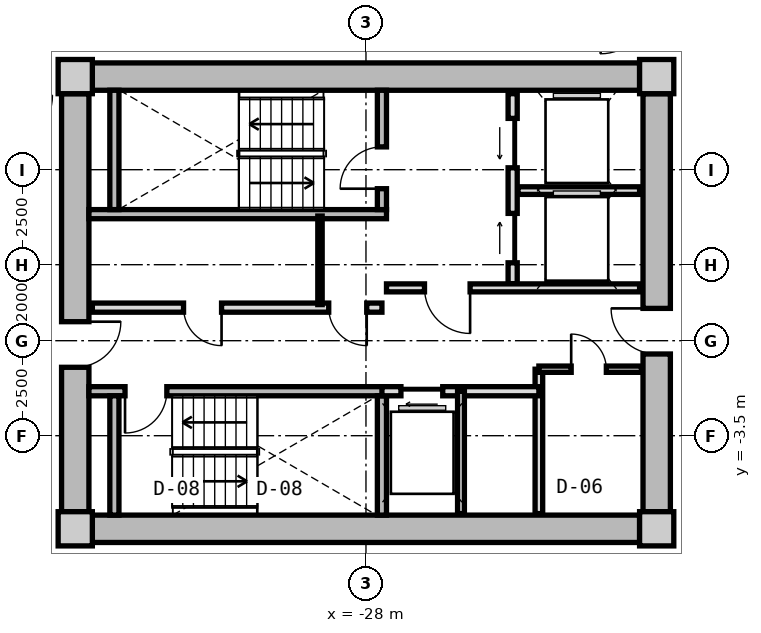
"""IFC4 building model, lengths in metres.
Left out: names, types, materials, properties, quantities, classifications, styles, units other than length and angle.
Written with IfcOpenShell. Run it as: python <this file> out.ifc"""

import sys

from ifc_helpers import new_model, si_unit, direction, frame, frame_2d, origin, origin_2d, place, context, subcontext, project, spatial, rectangle, extrude, source, transform, mapped, element, fill, save


model = new_model("IFC4")
c1 = context("Model", 3, precision=1e-05, world=origin(), true_north=direction((0.0, 1.0)))
c2 = subcontext(c1, "Body", "Model", "MODEL_VIEW")
j1 = project(units=[si_unit("LENGTHUNIT", "METRE"), si_unit("PLANEANGLEUNIT", "RADIAN")], contexts=[c1])
p1 = place(None, origin())
s1 = spatial("IfcSite", under=j1, at=p1, CompositionType="ELEMENT")
p2 = place(p1, origin())
s2 = spatial("IfcBuilding", under=s1, at=p2, CompositionType="ELEMENT")
p3 = place(p2, frame((0.0, 0.0, 120.65)))
s3 = spatial("IfcBuildingStorey", under=s2, at=p3, CompositionType="ELEMENT", Elevation=120.65)
m1 = source(origin(), c2, "Body", "SweptSolid", [
    extrude(rectangle(XDim=0.9, YDim=0.9, at=origin_2d()), origin(), (0.0, 0.0, 1.0), 3.05),
])
for number, where, z_axis, x_axis in (
    (1, (-35.65, -5.95, 0.0), (0.0, 0.0, 1.0), (1.0, 0.0, 0.0)),
    (2, (-20.35, -5.95, 0.0), (0.0, 0.0, 1.0), (1.0, 0.0, 0.0)),
    (3, (-20.35, 5.95, 0.0), (0.0, 0.0, 1.0), (1.0, 0.0, 0.0)),
    (4, (-35.65, 5.95, 0.0), (0.0, 0.0, 1.0), (1.0, 0.0, 0.0)),
):
    element("IfcColumn", number, at=place(p3, frame(where, z_axis=z_axis, x_axis=x_axis)), inside=s3, PredefinedType="COLUMN", context=c2, shape_type="MappedRepresentation", body=[
        mapped(m1, transform((0.0, 0.0, 0.0), x_axis=(1.0, 0.0, 0.0), y_axis=(0.0, 1.0, 0.0), z_axis=(0.0, 0.0, 1.0), scale=1.0)),
    ])
m2 = source(origin(), c2, "Body", "SweptSolid", [
    extrude(rectangle(XDim=14.4, YDim=0.72, at=frame_2d((7.2, 0.0))), origin(), (0.0, 0.0, 1.0), 2.79),
])
for number, where, z_axis, x_axis in (
    (5, (-35.2, 5.95, 0.0), (0.0, 0.0, 1.0), (1.0, 0.0, 0.0)),
    (6, (-20.8, -5.95, 0.0), (0.0, 0.0, 1.0), (-1.0, 0.0, 0.0)),
):
    element("IfcWall", number, at=place(p3, frame(where, z_axis=z_axis, x_axis=x_axis)), inside=s3, PredefinedType="SHEAR", context=c2, shape_type="MappedRepresentation", body=[
        mapped(m2, transform((0.0, 0.0, 0.0), x_axis=(1.0, 0.0, 0.0), y_axis=(0.0, 1.0, 0.0), z_axis=(0.0, 0.0, 1.0), scale=1.0)),
    ])
m3 = source(origin(), c2, "Body", "SweptSolid", [
    extrude(rectangle(XDim=11.0, YDim=0.72, at=frame_2d((5.5, 0.0))), origin(), (0.0, 0.0, 1.0), 2.79),
])
p4 = place(p3, frame((-35.65, -5.5, 0.0), z_axis=(0.0, 0.0, 1.0), x_axis=(0.0, 1.0, 0.0)))
e7 = element("IfcWall", 7, at=p4, inside=s3, PredefinedType="SHEAR", context=c2, shape_type="MappedRepresentation", body=[
    mapped(m3, transform((0.0, 0.0, 0.0), x_axis=(1.0, 0.0, 0.0), y_axis=(0.0, 1.0, 0.0), z_axis=(0.0, 0.0, 1.0), scale=1.0)),
])
p5 = place(p4, frame((3.8, 0.0, 0.0)))
e8 = element("IfcOpeningElement", 8, at=p5, cuts=e7, PredefinedType="OPENING", context=c2, shape_type="SweptSolid", body=[
    extrude(rectangle(XDim=1.2, YDim=2.15, at=frame_2d((0.6, 1.075))), frame((0.0, 0.37, 0.0), z_axis=(0.0, -1.0, 0.0), x_axis=(1.0, 0.0, 0.0)), (0.0, 0.0, 1.0), 0.74),
])
p6 = place(p3, frame((-20.35, 5.5, 0.0), z_axis=(0.0, 0.0, 1.0), x_axis=(0.0, -1.0, 0.0)))
e9 = element("IfcWall", 9, at=p6, inside=s3, PredefinedType="SHEAR", context=c2, shape_type="MappedRepresentation", body=[
    mapped(m3, transform((0.0, 0.0, 0.0), x_axis=(1.0, 0.0, 0.0), y_axis=(0.0, 1.0, 0.0), z_axis=(0.0, 0.0, 1.0), scale=1.0)),
])
p7 = place(p6, frame((5.65, 0.0, 0.0)))
e10 = element("IfcOpeningElement", 10, at=p7, cuts=e9, PredefinedType="OPENING", context=c2, shape_type="SweptSolid", body=[
    extrude(rectangle(XDim=1.2, YDim=2.15, at=frame_2d((0.6, 1.075))), frame((0.0, 0.37, 0.0), z_axis=(0.0, -1.0, 0.0), x_axis=(1.0, 0.0, 0.0)), (0.0, 0.0, 1.0), 0.74),
])
m4 = source(origin(), c2, "Body", "SweptSolid", [
    extrude(rectangle(XDim=7.83, YDim=0.24, at=frame_2d((3.915, 0.0))), origin(), (0.0, 0.0, 1.0), 2.79),
])
p8 = place(p3, frame((-35.29, 2.33, 0.0), z_axis=(0.0, 0.0, 1.0), x_axis=(1.0, 0.0, 0.0)))
e11 = element("IfcWall", 11, at=p8, inside=s3, PredefinedType="PARTITIONING", context=c2, shape_type="MappedRepresentation", body=[
    mapped(m4, transform((0.0, 0.0, 0.0), x_axis=(1.0, 0.0, 0.0), y_axis=(0.0, 1.0, 0.0), z_axis=(0.0, 0.0, 1.0), scale=1.0)),
])
m5 = source(origin(), c2, "Body", "SweptSolid", [
    extrude(rectangle(XDim=3.14, YDim=0.24, at=frame_2d((1.57, 0.0))), origin(), (0.0, 0.0, 1.0), 2.79),
])
p9 = place(p3, frame((-34.62, 2.45, 0.0), z_axis=(0.0, 0.0, 1.0), x_axis=(0.0, 1.0, 0.0)))
e12 = element("IfcWall", 12, at=p9, inside=s3, PredefinedType="PARTITIONING", context=c2, shape_type="MappedRepresentation", body=[
    mapped(m5, transform((0.0, 0.0, 0.0), x_axis=(1.0, 0.0, 0.0), y_axis=(0.0, 1.0, 0.0), z_axis=(0.0, 0.0, 1.0), scale=1.0)),
])
p10 = place(p3, frame((-27.58, 2.45, 0.0), z_axis=(0.0, 0.0, 1.0), x_axis=(0.0, 1.0, 0.0)))
e13 = element("IfcWall", 13, at=p10, inside=s3, PredefinedType="PARTITIONING", context=c2, shape_type="MappedRepresentation", body=[
    mapped(m5, transform((0.0, 0.0, 0.0), x_axis=(1.0, 0.0, 0.0), y_axis=(0.0, 1.0, 0.0), z_axis=(0.0, 0.0, 1.0), scale=1.0)),
])
p11 = place(p10, frame((0.55, 0.0, 0.0)))
e14 = element("IfcOpeningElement", 14, at=p11, cuts=e13, PredefinedType="OPENING", context=c2, shape_type="SweptSolid", body=[
    extrude(rectangle(XDim=1.1, YDim=2.15, at=frame_2d((0.55, 1.075))), frame((0.0, 0.13, 0.0), z_axis=(0.0, -1.0, 0.0), x_axis=(1.0, 0.0, 0.0)), (0.0, 0.0, 1.0), 0.26),
])
p12 = place(p3, frame((-35.29, -2.33, 0.0), z_axis=(0.0, 0.0, 1.0), x_axis=(1.0, 0.0, 0.0)))
e15 = element("IfcWall", 15, at=p12, inside=s3, PredefinedType="PARTITIONING", context=c2, shape_type="MappedRepresentation", body=[
    mapped(m4, transform((0.0, 0.0, 0.0), x_axis=(1.0, 0.0, 0.0), y_axis=(0.0, 1.0, 0.0), z_axis=(0.0, 0.0, 1.0), scale=1.0)),
])
p13 = place(p12, frame((0.95, 0.0, 0.0)))
e16 = element("IfcOpeningElement", 16, at=p13, cuts=e15, PredefinedType="OPENING", context=c2, shape_type="SweptSolid", body=[
    extrude(rectangle(XDim=1.1, YDim=2.15, at=frame_2d((0.55, 1.075))), frame((0.0, 0.13, 0.0), z_axis=(0.0, -1.0, 0.0), x_axis=(1.0, 0.0, 0.0)), (0.0, 0.0, 1.0), 0.26),
])
for number, where, z_axis, x_axis in (
    (17, (-34.62, -5.59, 0.0), (0.0, 0.0, 1.0), (0.0, 1.0, 0.0)),
    (18, (-27.58, -5.59, 0.0), (0.0, 0.0, 1.0), (0.0, 1.0, 0.0)),
):
    element("IfcWall", number, at=place(p3, frame(where, z_axis=z_axis, x_axis=x_axis)), inside=s3, PredefinedType="PARTITIONING", context=c2, shape_type="MappedRepresentation", body=[
        mapped(m5, transform((0.0, 0.0, 0.0), x_axis=(1.0, 0.0, 0.0), y_axis=(0.0, 1.0, 0.0), z_axis=(0.0, 0.0, 1.0), scale=1.0)),
    ])
m6 = source(origin(), c2, "Body", "SweptSolid", [
    extrude(rectangle(XDim=5.0, YDim=0.24, at=frame_2d((2.5, 0.0))), origin(), (0.0, 0.0, 1.0), 2.775),
])
p14 = place(p3, frame((-24.14, 0.5, 0.0), z_axis=(0.0, 0.0, 1.0), x_axis=(0.0, 1.0, 0.0)))
e19 = element("IfcWall", 19, at=p14, inside=s3, PredefinedType="PARTITIONING", context=c2, shape_type="MappedRepresentation", body=[
    mapped(m6, transform((0.0, 0.0, 0.0), x_axis=(1.0, 0.0, 0.0), y_axis=(0.0, 1.0, 0.0), z_axis=(0.0, 0.0, 1.0), scale=1.0)),
])
p15 = place(p14, frame((3.05, 0.0, 0.0)))
e20 = element("IfcOpeningElement", 20, at=p15, cuts=e19, PredefinedType="OPENING", context=c2, shape_type="SweptSolid", body=[
    extrude(rectangle(XDim=1.3, YDim=2.2, at=frame_2d((0.65, 1.1))), frame((0.0, 0.13, 0.0), z_axis=(0.0, -1.0, 0.0), x_axis=(1.0, 0.0, 0.0)), (0.0, 0.0, 1.0), 0.26),
])
p16 = place(p14, frame((0.55, 0.0, 0.0)))
e21 = element("IfcOpeningElement", 21, at=p16, cuts=e19, PredefinedType="OPENING", context=c2, shape_type="SweptSolid", body=[
    extrude(rectangle(XDim=1.3, YDim=2.2, at=frame_2d((0.65, 1.1))), frame((0.0, 0.13, 0.0), z_axis=(0.0, -1.0, 0.0), x_axis=(1.0, 0.0, 0.0)), (0.0, 0.0, 1.0), 0.26),
])
m7 = source(origin(), c2, "Body", "SweptSolid", [
    extrude(rectangle(XDim=3.2, YDim=0.2, at=frame_2d((1.6, 0.0))), origin(), (0.0, 0.0, 1.0), 2.775),
])
p17 = place(p3, frame((-24.0, 2.95, 0.0), z_axis=(0.0, 0.0, 1.0), x_axis=(1.0, 0.0, 0.0)))
e22 = element("IfcWall", 22, at=p17, inside=s3, PredefinedType="PARTITIONING", context=c2, shape_type="MappedRepresentation", body=[
    mapped(m7, transform((0.0, 0.0, 0.0), x_axis=(1.0, 0.0, 0.0), y_axis=(0.0, 1.0, 0.0), z_axis=(0.0, 0.0, 1.0), scale=1.0)),
])
m8 = source(origin(), c2, "Body", "SweptSolid", [
    extrude(rectangle(XDim=6.66, YDim=0.21, at=frame_2d((3.33, 0.0))), origin(), (0.0, 0.0, 1.0), 2.775),
])
p18 = place(p3, frame((-27.46, 0.39, 0.0), z_axis=(0.0, 0.0, 1.0), x_axis=(1.0, 0.0, 0.0)))
e23 = element("IfcWall", 23, at=p18, inside=s3, PredefinedType="PARTITIONING", context=c2, shape_type="MappedRepresentation", body=[
    mapped(m8, transform((0.0, 0.0, 0.0), x_axis=(1.0, 0.0, 0.0), y_axis=(0.0, 1.0, 0.0), z_axis=(0.0, 0.0, 1.0), scale=1.0)),
])
p19 = place(p18, frame((1.0, 0.0, 0.0)))
e24 = element("IfcOpeningElement", 24, at=p19, cuts=e23, PredefinedType="OPENING", context=c2, shape_type="SweptSolid", body=[
    extrude(rectangle(XDim=1.2, YDim=2.15, at=frame_2d((0.6, 1.075))), frame((0.0, 0.115, 0.0), z_axis=(0.0, -1.0, 0.0), x_axis=(1.0, 0.0, 0.0)), (0.0, 0.0, 1.0), 0.23),
])
m9 = source(origin(), c2, "Body", "SweptSolid", [
    extrude(rectangle(XDim=7.62, YDim=0.24, at=frame_2d((3.81, 0.0))), origin(), (0.0, 0.0, 1.0), 2.775),
])
p20 = place(p3, frame((-35.2, -0.13, 0.0), z_axis=(0.0, 0.0, 1.0), x_axis=(1.0, 0.0, 0.0)))
e25 = element("IfcWall", 25, at=p20, inside=s3, PredefinedType="PARTITIONING", context=c2, shape_type="MappedRepresentation", body=[
    mapped(m9, transform((0.0, 0.0, 0.0), x_axis=(1.0, 0.0, 0.0), y_axis=(0.0, 1.0, 0.0), z_axis=(0.0, 0.0, 1.0), scale=1.0)),
])
p21 = place(p20, frame((6.22, 0.0, 0.0)))
e26 = element("IfcOpeningElement", 26, at=p21, cuts=e25, PredefinedType="OPENING", context=c2, shape_type="SweptSolid", body=[
    extrude(rectangle(XDim=1.0, YDim=2.1, at=frame_2d((0.5, 1.05))), frame((0.0, 0.13, 0.0), z_axis=(0.0, -1.0, 0.0), x_axis=(1.0, 0.0, 0.0)), (0.0, 0.0, 1.0), 0.26),
])
p22 = place(p20, frame((2.4, 0.0, 0.0)))
e27 = element("IfcOpeningElement", 27, at=p22, cuts=e25, PredefinedType="OPENING", context=c2, shape_type="SweptSolid", body=[
    extrude(rectangle(XDim=1.0, YDim=2.1, at=frame_2d((0.5, 1.05))), frame((0.0, 0.13, 0.0), z_axis=(0.0, -1.0, 0.0), x_axis=(1.0, 0.0, 0.0)), (0.0, 0.0, 1.0), 0.26),
])
m10 = source(origin(), c2, "Body", "SweptSolid", [
    extrude(rectangle(XDim=2.33, YDim=0.115, at=frame_2d((1.165, 0.0))), origin(), (0.0, 0.0, 1.0), 2.775),
])
p23 = place(p3, frame((-29.21, -0.05, 0.0), z_axis=(0.0, 0.0, 1.0), x_axis=(0.0, 1.0, 0.0)))
e28 = element("IfcWall", 28, at=p23, inside=s3, PredefinedType="PARTITIONING", context=c2, shape_type="MappedRepresentation", body=[
    mapped(m10, transform((0.0, 0.0, 0.0), x_axis=(1.0, 0.0, 0.0), y_axis=(0.0, 1.0, 0.0), z_axis=(0.0, 0.0, 1.0), scale=1.0)),
])
m11 = source(origin(), c2, "Body", "SweptSolid", [
    extrude(rectangle(XDim=3.8, YDim=0.2, at=frame_2d((1.9, 0.0))), origin(), (0.0, 0.0, 1.0), 2.775),
])
p24 = place(p3, frame((-23.45, -5.55, 0.0), z_axis=(0.0, 0.0, 1.0), x_axis=(0.0, 1.0, 0.0)))
e29 = element("IfcWall", 29, at=p24, inside=s3, PredefinedType="PARTITIONING", context=c2, shape_type="MappedRepresentation", body=[
    mapped(m11, transform((0.0, 0.0, 0.0), x_axis=(1.0, 0.0, 0.0), y_axis=(0.0, 1.0, 0.0), z_axis=(0.0, 0.0, 1.0), scale=1.0)),
])
m12 = source(origin(), c2, "Body", "SweptSolid", [
    extrude(rectangle(XDim=4.13, YDim=0.24, at=frame_2d((2.065, 0.0))), origin(), (0.0, 0.0, 1.0), 2.775),
])
p25 = place(p3, frame((-27.58, -2.33, 0.0), z_axis=(0.0, 0.0, 1.0), x_axis=(1.0, 0.0, 0.0)))
e30 = element("IfcWall", 30, at=p25, inside=s3, PredefinedType="PARTITIONING", context=c2, shape_type="MappedRepresentation", body=[
    mapped(m12, transform((0.0, 0.0, 0.0), x_axis=(1.0, 0.0, 0.0), y_axis=(0.0, 1.0, 0.0), z_axis=(0.0, 0.0, 1.0), scale=1.0)),
])
p26 = place(p25, frame((0.5, 0.0, 0.0)))
e31 = element("IfcOpeningElement", 31, at=p26, cuts=e30, PredefinedType="OPENING", context=c2, shape_type="SweptSolid", body=[
    extrude(rectangle(XDim=1.1, YDim=2.2, at=frame_2d((0.55, 1.1))), frame((0.0, 0.13, 0.0), z_axis=(0.0, -1.0, 0.0), x_axis=(1.0, 0.0, 0.0)), (0.0, 0.0, 1.0), 0.26),
])
m13 = source(origin(), c2, "Body", "SweptSolid", [
    extrude(rectangle(XDim=3.22, YDim=0.18, at=frame_2d((1.61, 0.0))), origin(), (0.0, 0.0, 1.0), 2.775),
])
p27 = place(p3, frame((-25.5, -5.55, 0.0), z_axis=(0.0, 0.0, 1.0), x_axis=(0.0, 1.0, 0.0)))
e32 = element("IfcWall", 32, at=p27, inside=s3, PredefinedType="PARTITIONING", context=c2, shape_type="MappedRepresentation", body=[
    mapped(m13, transform((0.0, 0.0, 0.0), x_axis=(1.0, 0.0, 0.0), y_axis=(0.0, 1.0, 0.0), z_axis=(0.0, 0.0, 1.0), scale=1.0)),
])
m14 = source(origin(), c2, "Body", "SweptSolid", [
    extrude(rectangle(XDim=2.7, YDim=0.165, at=frame_2d((1.35, 0.0))), origin(), (0.0, 0.0, 1.0), 2.775),
])
p28 = place(p3, frame((-23.45, -1.75, 0.0), z_axis=(0.0, 0.0, 1.0), x_axis=(1.0, 0.0, 0.0)))
e33 = element("IfcWall", 33, at=p28, inside=s3, PredefinedType="PARTITIONING", context=c2, shape_type="MappedRepresentation", body=[
    mapped(m14, transform((0.0, 0.0, 0.0), x_axis=(1.0, 0.0, 0.0), y_axis=(0.0, 1.0, 0.0), z_axis=(0.0, 0.0, 1.0), scale=1.0)),
])
p29 = place(p28, frame((0.85, 0.0, 0.0)))
e34 = element("IfcOpeningElement", 34, at=p29, cuts=e33, PredefinedType="OPENING", context=c2, shape_type="SweptSolid", body=[
    extrude(rectangle(XDim=0.925, YDim=2.1, at=frame_2d((0.462, 1.05))), frame((0.0, 0.093, 0.0), z_axis=(0.0, -1.0, 0.0), x_axis=(1.0, 0.0, 0.0)), (0.0, 0.0, 1.0), 0.185),
])
m15 = source(origin(), c2, "Body", "SweptSolid", [
    extrude(rectangle(XDim=1.1, YDim=2.15, at=frame_2d((0.55, 1.075))), frame((0.0, 0.025, 0.0), z_axis=(0.0, -1.0, 0.0), x_axis=(1.0, 0.0, 0.0)), (0.0, 0.0, 1.0), 0.05),
])
p30 = place(p11, origin())
e35 = element("IfcDoor", 35, at=p30, inside=s3, OperationType="SINGLE_SWING_LEFT", PredefinedType="DOOR", context=c2, shape_type="MappedRepresentation", body=[
    mapped(m15, transform((0.0, 0.0, 0.0), x_axis=(1.0, 0.0, 0.0), y_axis=(0.0, 1.0, 0.0), z_axis=(0.0, 0.0, 1.0), scale=1.0)),
])
fill(e14, e35)
p31 = place(p13, frame((1.1, 0.0, 0.0), z_axis=(0.0, 0.0, 1.0), x_axis=(-1.0, 0.0, 0.0)))
e36 = element("IfcDoor", 36, at=p31, inside=s3, OperationType="SINGLE_SWING_RIGHT", PredefinedType="DOOR", context=c2, shape_type="MappedRepresentation", body=[
    mapped(m15, transform((0.0, 0.0, 0.0), x_axis=(1.0, 0.0, 0.0), y_axis=(0.0, 1.0, 0.0), z_axis=(0.0, 0.0, 1.0), scale=1.0)),
])
fill(e16, e36)
m16 = source(origin(), c2, "Body", "SweptSolid", [
    extrude(rectangle(XDim=1.3, YDim=2.2, at=frame_2d((0.65, 1.1))), frame((0.0, 0.025, 0.0), z_axis=(0.0, -1.0, 0.0), x_axis=(1.0, 0.0, 0.0)), (0.0, 0.0, 1.0), 0.05),
])
p32 = place(p15, origin())
e37 = element("IfcDoor", 37, at=p32, inside=s3, OperationType="SLIDING_TO_LEFT", PredefinedType="DOOR", context=c2, shape_type="MappedRepresentation", body=[
    mapped(m16, transform((0.0, 0.0, 0.0), x_axis=(1.0, 0.0, 0.0), y_axis=(0.0, 1.0, 0.0), z_axis=(0.0, 0.0, 1.0), scale=1.0)),
])
fill(e20, e37)
p33 = place(p16, origin())
e38 = element("IfcDoor", 38, at=p33, inside=s3, OperationType="SLIDING_TO_RIGHT", PredefinedType="DOOR", context=c2, shape_type="MappedRepresentation", body=[
    mapped(m16, transform((0.0, 0.0, 0.0), x_axis=(1.0, 0.0, 0.0), y_axis=(0.0, 1.0, 0.0), z_axis=(0.0, 0.0, 1.0), scale=1.0)),
])
fill(e21, e38)
m17 = source(origin(), c2, "Body", "SweptSolid", [
    extrude(rectangle(XDim=1.2, YDim=2.15, at=frame_2d((0.6, 1.075))), frame((0.0, 0.025, 0.0), z_axis=(0.0, -1.0, 0.0), x_axis=(1.0, 0.0, 0.0)), (0.0, 0.0, 1.0), 0.05),
])
p34 = place(p19, frame((1.2, 0.0, 0.0), z_axis=(0.0, 0.0, 1.0), x_axis=(-1.0, 0.0, 0.0)))
e39 = element("IfcDoor", 39, at=p34, inside=s3, OperationType="SINGLE_SWING_LEFT", PredefinedType="DOOR", context=c2, shape_type="MappedRepresentation", body=[
    mapped(m17, transform((0.0, 0.0, 0.0), x_axis=(1.0, 0.0, 0.0), y_axis=(0.0, 1.0, 0.0), z_axis=(0.0, 0.0, 1.0), scale=1.0)),
])
fill(e24, e39)
p35 = place(p5, frame((1.2, 0.0, 0.0), z_axis=(0.0, 0.0, 1.0), x_axis=(-1.0, 0.0, 0.0)))
e40 = element("IfcDoor", 40, at=p35, inside=s3, OperationType="SINGLE_SWING_LEFT", PredefinedType="DOOR", context=c2, shape_type="MappedRepresentation", body=[
    mapped(m17, transform((0.0, 0.0, 0.0), x_axis=(1.0, 0.0, 0.0), y_axis=(0.0, 1.0, 0.0), z_axis=(0.0, 0.0, 1.0), scale=1.0)),
])
fill(e8, e40)
p36 = place(p7, frame((1.2, 0.0, 0.0), z_axis=(0.0, 0.0, 1.0), x_axis=(-1.0, 0.0, 0.0)))
e41 = element("IfcDoor", 41, at=p36, inside=s3, OperationType="SINGLE_SWING_RIGHT", PredefinedType="DOOR", context=c2, shape_type="MappedRepresentation", body=[
    mapped(m17, transform((0.0, 0.0, 0.0), x_axis=(1.0, 0.0, 0.0), y_axis=(0.0, 1.0, 0.0), z_axis=(0.0, 0.0, 1.0), scale=1.0)),
])
fill(e10, e41)
m18 = source(origin(), c2, "Body", "SweptSolid", [
    extrude(rectangle(XDim=1.0, YDim=2.1, at=frame_2d((0.5, 1.05))), frame((0.0, 0.025, 0.0), z_axis=(0.0, -1.0, 0.0), x_axis=(1.0, 0.0, 0.0)), (0.0, 0.0, 1.0), 0.05),
])
p37 = place(p21, frame((1.0, 0.0, 0.0), z_axis=(0.0, 0.0, 1.0), x_axis=(-1.0, 0.0, 0.0)))
e42 = element("IfcDoor", 42, at=p37, inside=s3, OperationType="SINGLE_SWING_LEFT", PredefinedType="DOOR", context=c2, shape_type="MappedRepresentation", body=[
    mapped(m18, transform((0.0, 0.0, 0.0), x_axis=(1.0, 0.0, 0.0), y_axis=(0.0, 1.0, 0.0), z_axis=(0.0, 0.0, 1.0), scale=1.0)),
])
fill(e26, e42)
p38 = place(p22, frame((1.0, 0.0, 0.0), z_axis=(0.0, 0.0, 1.0), x_axis=(-1.0, 0.0, 0.0)))
e43 = element("IfcDoor", 43, at=p38, inside=s3, OperationType="SINGLE_SWING_LEFT", PredefinedType="DOOR", context=c2, shape_type="MappedRepresentation", body=[
    mapped(m18, transform((0.0, 0.0, 0.0), x_axis=(1.0, 0.0, 0.0), y_axis=(0.0, 1.0, 0.0), z_axis=(0.0, 0.0, 1.0), scale=1.0)),
])
fill(e27, e43)
m19 = source(origin(), c2, "Body", "SweptSolid", [
    extrude(rectangle(XDim=1.1, YDim=2.2, at=frame_2d((0.55, 1.1))), frame((0.0, 0.025, 0.0), z_axis=(0.0, -1.0, 0.0), x_axis=(1.0, 0.0, 0.0)), (0.0, 0.0, 1.0), 0.05),
])
p39 = place(p26, frame((1.1, 0.0, 0.0), z_axis=(0.0, 0.0, 1.0), x_axis=(-1.0, 0.0, 0.0)))
e44 = element("IfcDoor", 44, at=p39, inside=s3, OperationType="SLIDING_TO_LEFT", PredefinedType="DOOR", context=c2, shape_type="MappedRepresentation", body=[
    mapped(m19, transform((0.0, 0.0, 0.0), x_axis=(1.0, 0.0, 0.0), y_axis=(0.0, 1.0, 0.0), z_axis=(0.0, 0.0, 1.0), scale=1.0)),
])
fill(e31, e44)
m20 = source(origin(), c2, "Body", "SweptSolid", [
    extrude(rectangle(XDim=0.925, YDim=2.1, at=frame_2d((0.462, 1.05))), frame((0.0, 0.025, 0.0), z_axis=(0.0, -1.0, 0.0), x_axis=(1.0, 0.0, 0.0)), (0.0, 0.0, 1.0), 0.05),
])
p40 = place(p29, origin())
e45 = element("IfcDoor", 45, at=p40, inside=s3, OperationType="SINGLE_SWING_LEFT", PredefinedType="DOOR", context=c2, shape_type="MappedRepresentation", body=[
    mapped(m20, transform((0.0, 0.0, 0.0), x_axis=(1.0, 0.0, 0.0), y_axis=(0.0, 1.0, 0.0), z_axis=(0.0, 0.0, 1.0), scale=1.0)),
])
fill(e34, e45)
save(model, sys.argv[1])
